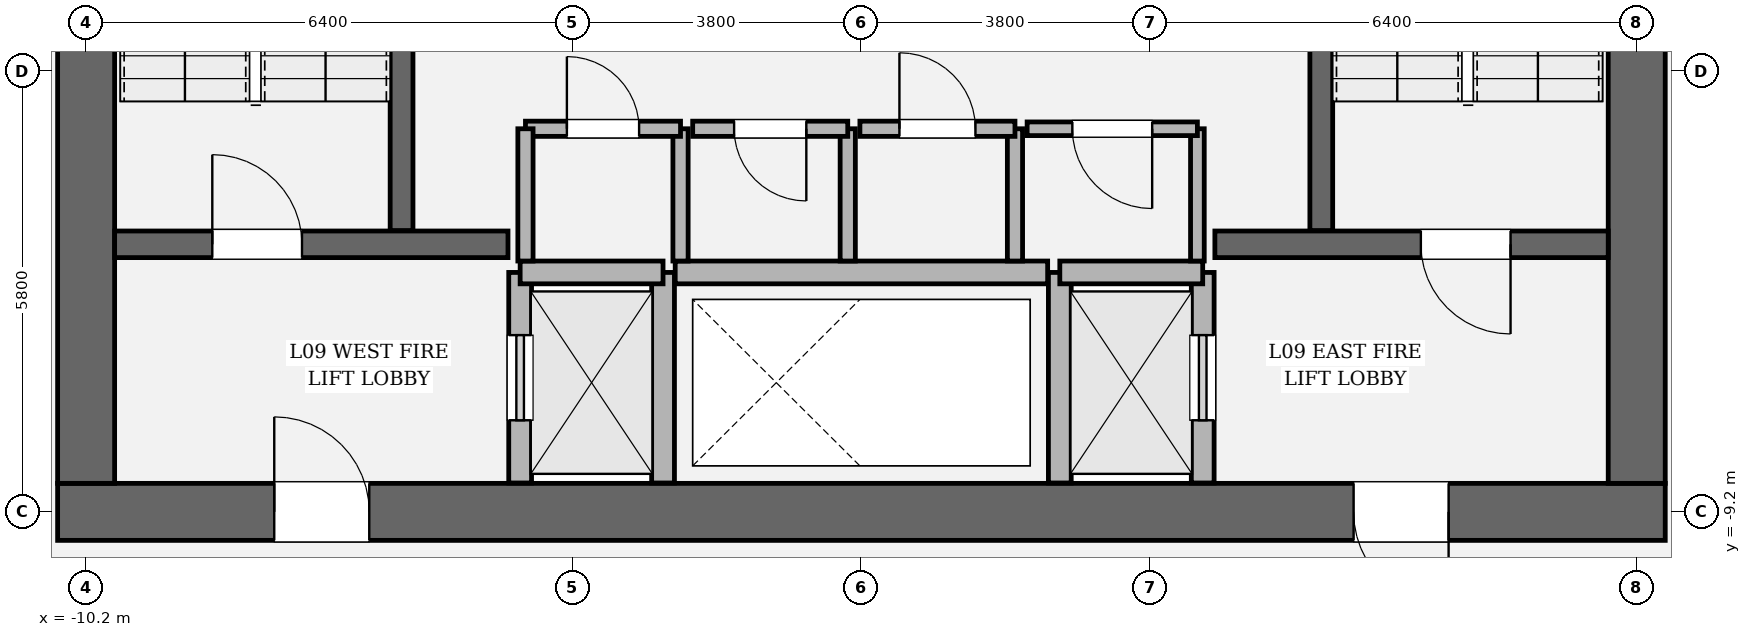
"""IFC4 building model, lengths in metres.
Left out: names, types, materials, properties, quantities, classifications, styles, units other than length and angle.
Written with IfcOpenShell. Run it as: python <this file> out.ifc"""

import sys

from ifc_helpers import new_model, si_unit, direction, frame, frame_2d, origin, place, context, subcontext, project, spatial, rectangle, extrude, element, fill, save


model = new_model("IFC4")
c1 = context("Model", 3, precision=1e-05, world=origin(), true_north=direction((0.0, 1.0)))
c2 = subcontext(c1, "Body", "Model", "MODEL_VIEW")
j1 = project(units=[si_unit("LENGTHUNIT", "METRE"), si_unit("PLANEANGLEUNIT", "RADIAN")], contexts=[c1])
p1 = place(None, origin())
s1 = spatial("IfcSite", under=j1, at=p1, CompositionType="ELEMENT")
p2 = place(p1, origin())
s2 = spatial("IfcBuilding", under=s1, at=p2, CompositionType="ELEMENT")
p3 = place(p2, frame((0.0, 0.0, 44.4)))
s3 = spatial("IfcBuildingStorey", under=s2, at=p3, CompositionType="ELEMENT", Elevation=44.4)
p4 = place(p3, frame((10.575, -9.2, 0.0), z_axis=(0.0, 0.0, 1.0), x_axis=(-1.0, 0.0, 0.0)))
e1 = element("IfcWall", 1, at=p4, inside=s3, PredefinedType="SHEAR", context=c2, shape_type="SweptSolid", body=[
    extrude(rectangle(XDim=21.15, YDim=0.75, at=frame_2d((10.575, 0.0))), origin(), (0.0, 0.0, 1.0), 4.05),
])
p5 = place(p4, frame((2.85, 0.0, 0.0)))
e2 = element("IfcOpeningElement", 2, at=p5, cuts=e1, PredefinedType="OPENING", context=c2, shape_type="SweptSolid", body=[
    extrude(rectangle(XDim=1.25, YDim=2.25, at=frame_2d((0.625, 1.125))), frame((0.0, 0.385, 0.0), z_axis=(0.0, -1.0, 0.0), x_axis=(1.0, 0.0, 0.0)), (0.0, 0.0, 1.0), 0.77),
])
p6 = place(p4, frame((17.05, 0.0, 0.0)))
e3 = element("IfcOpeningElement", 3, at=p6, cuts=e1, PredefinedType="OPENING", context=c2, shape_type="SweptSolid", body=[
    extrude(rectangle(XDim=1.25, YDim=2.25, at=frame_2d((0.625, 1.125))), frame((0.0, 0.385, 0.0), z_axis=(0.0, -1.0, 0.0), x_axis=(1.0, 0.0, 0.0)), (0.0, 0.0, 1.0), 0.77),
])
p7 = place(p3, frame((-10.2, -8.825, 0.0), z_axis=(0.0, 0.0, 1.0), x_axis=(0.0, 1.0, 0.0)))
e4 = element("IfcWall", 4, at=p7, inside=s3, PredefinedType="SHEAR", context=c2, shape_type="SweptSolid", body=[
    extrude(rectangle(XDim=17.65, YDim=0.75, at=frame_2d((8.825, 0.0))), origin(), (0.0, 0.0, 1.0), 4.05),
])
p8 = place(p7, frame((12.615, 0.0, 0.0)))
e5 = element("IfcOpeningElement", 5, at=p8, cuts=e4, PredefinedType="OPENING", context=c2, shape_type="SweptSolid", body=[
    extrude(rectangle(XDim=1.18, YDim=2.2, at=frame_2d((0.59, 1.1))), frame((0.0, 0.385, 0.0), z_axis=(0.0, -1.0, 0.0), x_axis=(1.0, 0.0, 0.0)), (0.0, 0.0, 1.0), 0.77),
])
p9 = place(p3, frame((10.2, 8.825, 0.0), z_axis=(0.0, 0.0, 1.0), x_axis=(0.0, -1.0, 0.0)))
e6 = element("IfcWall", 6, at=p9, inside=s3, PredefinedType="SHEAR", context=c2, shape_type="SweptSolid", body=[
    extrude(rectangle(XDim=17.65, YDim=0.75, at=frame_2d((8.825, 0.0))), origin(), (0.0, 0.0, 1.0), 4.05),
])
p10 = place(p9, frame((3.855, 0.0, 0.0)))
e7 = element("IfcOpeningElement", 7, at=p10, cuts=e6, PredefinedType="OPENING", context=c2, shape_type="SweptSolid", body=[
    extrude(rectangle(XDim=1.18, YDim=2.2, at=frame_2d((0.59, 1.1))), frame((0.0, 0.385, 0.0), z_axis=(0.0, -1.0, 0.0), x_axis=(1.0, 0.0, 0.0)), (0.0, 0.0, 1.0), 0.77),
])
for number, where, z_axis, x_axis in (
    (8, (-6.05, -5.5, 0.0), (0.0, 0.0, 1.0), (0.0, 1.0, 0.0)),
    (9, (6.05, 3.45, 0.0), (0.0, 0.0, 1.0), (0.0, -1.0, 0.0)),
):
    element("IfcWall", number, at=place(p3, frame(where, z_axis=z_axis, x_axis=x_axis)), inside=s3, PredefinedType="SOLIDWALL", context=c2, shape_type="SweptSolid", body=[
        extrude(rectangle(XDim=8.95, YDim=0.3, at=frame_2d((4.475, 0.0))), origin(), (0.0, 0.0, 1.0), 4.05),
    ])
p11 = place(p3, frame((-9.825, -5.68, 0.0), z_axis=(0.0, 0.0, 1.0), x_axis=(1.0, 0.0, 0.0)))
e10 = element("IfcWall", 10, at=p11, inside=s3, PredefinedType="SOLIDWALL", context=c2, shape_type="SweptSolid", body=[
    extrude(rectangle(XDim=5.175, YDim=0.35, at=frame_2d((2.587, 0.0))), origin(), (0.0, 0.0, 1.0), 4.05),
])
p12 = place(p11, frame((1.285, 0.0, 0.0)))
e11 = element("IfcOpeningElement", 11, at=p12, cuts=e10, PredefinedType="OPENING", context=c2, shape_type="SweptSolid", body=[
    extrude(rectangle(XDim=1.18, YDim=2.2, at=frame_2d((0.59, 1.1))), frame((0.0, 0.185, 0.0), z_axis=(0.0, -1.0, 0.0), x_axis=(1.0, 0.0, 0.0)), (0.0, 0.0, 1.0), 0.37),
])
p13 = place(p3, frame((4.65, -5.68, 0.0), z_axis=(0.0, 0.0, 1.0), x_axis=(1.0, 0.0, 0.0)))
e12 = element("IfcWall", 12, at=p13, inside=s3, PredefinedType="SOLIDWALL", context=c2, shape_type="SweptSolid", body=[
    extrude(rectangle(XDim=5.175, YDim=0.35, at=frame_2d((2.587, 0.0))), origin(), (0.0, 0.0, 1.0), 4.05),
])
p14 = place(p13, frame((2.71, 0.0, 0.0)))
e13 = element("IfcOpeningElement", 13, at=p14, cuts=e12, PredefinedType="OPENING", context=c2, shape_type="SweptSolid", body=[
    extrude(rectangle(XDim=1.18, YDim=2.2, at=frame_2d((0.59, 1.1))), frame((0.0, 0.185, 0.0), z_axis=(0.0, -1.0, 0.0), x_axis=(1.0, 0.0, 0.0)), (0.0, 0.0, 1.0), 0.37),
])
p15 = place(p3, frame((-4.49, -8.82, 0.0), z_axis=(0.0, 0.0, 1.0), x_axis=(0.0, 1.0, 0.0)))
e14 = element("IfcWall", 14, at=p15, inside=s3, PredefinedType="SOLIDWALL", context=c2, shape_type="SweptSolid", body=[
    extrude(rectangle(XDim=2.77, YDim=0.3, at=frame_2d((1.385, 0.0))), origin(), (0.0, 0.0, 1.0), 3.81),
])
p16 = place(p15, frame((0.825, 0.0, 0.0)))
e15 = element("IfcOpeningElement", 15, at=p16, cuts=e14, PredefinedType="OPENING", context=c2, shape_type="SweptSolid", body=[
    extrude(rectangle(XDim=1.12, YDim=2.25, at=frame_2d((0.56, 1.125))), frame((0.0, 0.16, 0.0), z_axis=(0.0, -1.0, 0.0), x_axis=(1.0, 0.0, 0.0)), (0.0, 0.0, 1.0), 0.32),
])
p17 = place(p3, frame((-2.61, -8.82, 0.0), z_axis=(0.0, 0.0, 1.0), x_axis=(0.0, 1.0, 0.0)))
e16 = element("IfcWall", 16, at=p17, inside=s3, PredefinedType="SOLIDWALL", context=c2, shape_type="SweptSolid", body=[
    extrude(rectangle(XDim=2.77, YDim=0.3, at=frame_2d((1.385, 0.0))), origin(), (0.0, 0.0, 1.0), 3.81),
])
p18 = place(p3, frame((-4.49, -6.05, 0.0), z_axis=(0.0, 0.0, 1.0), x_axis=(1.0, 0.0, 0.0)))
e17 = element("IfcWall", 17, at=p18, inside=s3, PredefinedType="SOLIDWALL", context=c2, shape_type="SweptSolid", body=[
    extrude(rectangle(XDim=1.88, YDim=0.3, at=frame_2d((0.94, 0.0))), origin(), (0.0, 0.0, 1.0), 3.81),
])
p19 = place(p3, frame((4.49, -8.82, 0.0), z_axis=(0.0, 0.0, 1.0), x_axis=(0.0, 1.0, 0.0)))
e18 = element("IfcWall", 18, at=p19, inside=s3, PredefinedType="SOLIDWALL", context=c2, shape_type="SweptSolid", body=[
    extrude(rectangle(XDim=2.77, YDim=0.3, at=frame_2d((1.385, 0.0))), origin(), (0.0, 0.0, 1.0), 3.81),
])
p20 = place(p19, frame((0.825, 0.0, 0.0)))
e19 = element("IfcOpeningElement", 19, at=p20, cuts=e18, PredefinedType="OPENING", context=c2, shape_type="SweptSolid", body=[
    extrude(rectangle(XDim=1.12, YDim=2.25, at=frame_2d((0.56, 1.125))), frame((0.0, 0.16, 0.0), z_axis=(0.0, -1.0, 0.0), x_axis=(1.0, 0.0, 0.0)), (0.0, 0.0, 1.0), 0.32),
])
p21 = place(p3, frame((2.61, -8.82, 0.0), z_axis=(0.0, 0.0, 1.0), x_axis=(0.0, 1.0, 0.0)))
e20 = element("IfcWall", 20, at=p21, inside=s3, PredefinedType="SOLIDWALL", context=c2, shape_type="SweptSolid", body=[
    extrude(rectangle(XDim=2.77, YDim=0.3, at=frame_2d((1.385, 0.0))), origin(), (0.0, 0.0, 1.0), 3.81),
])
p22 = place(p3, frame((2.61, -6.05, 0.0), z_axis=(0.0, 0.0, 1.0), x_axis=(1.0, 0.0, 0.0)))
e21 = element("IfcWall", 21, at=p22, inside=s3, PredefinedType="SOLIDWALL", context=c2, shape_type="SweptSolid", body=[
    extrude(rectangle(XDim=1.88, YDim=0.3, at=frame_2d((0.94, 0.0))), origin(), (0.0, 0.0, 1.0), 3.81),
])
p23 = place(p3, frame((-2.45, -6.05, 0.0), z_axis=(0.0, 0.0, 1.0), x_axis=(1.0, 0.0, 0.0)))
e22 = element("IfcWall", 22, at=p23, inside=s3, PredefinedType="SOLIDWALL", context=c2, shape_type="SweptSolid", body=[
    extrude(rectangle(XDim=4.9, YDim=0.3, at=frame_2d((2.45, 0.0))), origin(), (0.0, 0.0, 1.0), 3.81),
])
p24 = place(p3, frame((-2.38, -5.9, 0.0), z_axis=(0.0, 0.0, 1.0), x_axis=(0.0, 1.0, 0.0)))
e23 = element("IfcWall", 23, at=p24, inside=s3, PredefinedType="SOLIDWALL", context=c2, shape_type="SweptSolid", body=[
    extrude(rectangle(XDim=1.74, YDim=0.2, at=frame_2d((0.87, 0.0))), origin(), (0.0, 0.0, 1.0), 3.81),
])
p25 = place(p3, frame((-2.38, -4.16, 0.0), z_axis=(0.0, 0.0, 1.0), x_axis=(-1.0, 0.0, 0.0)))
e24 = element("IfcWall", 24, at=p25, inside=s3, PredefinedType="SOLIDWALL", context=c2, shape_type="SweptSolid", body=[
    extrude(rectangle(XDim=2.04, YDim=0.2, at=frame_2d((1.02, 0.0))), origin(), (0.0, 0.0, 1.0), 3.81),
])
p26 = place(p25, frame((0.545, 0.0, 0.0)))
e25 = element("IfcOpeningElement", 25, at=p26, cuts=e24, PredefinedType="OPENING", context=c2, shape_type="SweptSolid", body=[
    extrude(rectangle(XDim=0.95, YDim=2.15, at=frame_2d((0.475, 1.075))), frame((0.0, 0.11, 0.0), z_axis=(0.0, -1.0, 0.0), x_axis=(1.0, 0.0, 0.0)), (0.0, 0.0, 1.0), 0.22),
])
for number, where, z_axis, x_axis in (
    (26, (-4.42, -4.16, 0.0), (0.0, 0.0, 1.0), (0.0, -1.0, 0.0)),
    (27, (-0.18, -5.9, 0.0), (0.0, 0.0, 1.0), (0.0, 1.0, 0.0)),
):
    element("IfcWall", number, at=place(p3, frame(where, z_axis=z_axis, x_axis=x_axis)), inside=s3, PredefinedType="SOLIDWALL", context=c2, shape_type="SweptSolid", body=[
        extrude(rectangle(XDim=1.74, YDim=0.2, at=frame_2d((0.87, 0.0))), origin(), (0.0, 0.0, 1.0), 3.81),
    ])
p27 = place(p3, frame((-0.18, -4.16, 0.0), z_axis=(0.0, 0.0, 1.0), x_axis=(-1.0, 0.0, 0.0)))
e28 = element("IfcWall", 28, at=p27, inside=s3, PredefinedType="SOLIDWALL", context=c2, shape_type="SweptSolid", body=[
    extrude(rectangle(XDim=2.04, YDim=0.2, at=frame_2d((1.02, 0.0))), origin(), (0.0, 0.0, 1.0), 3.81),
])
p28 = place(p27, frame((0.545, 0.0, 0.0)))
e29 = element("IfcOpeningElement", 29, at=p28, cuts=e28, PredefinedType="OPENING", context=c2, shape_type="SweptSolid", body=[
    extrude(rectangle(XDim=0.95, YDim=2.15, at=frame_2d((0.475, 1.075))), frame((0.0, 0.11, 0.0), z_axis=(0.0, -1.0, 0.0), x_axis=(1.0, 0.0, 0.0)), (0.0, 0.0, 1.0), 0.22),
])
p29 = place(p3, frame((2.02, -5.9, 0.0), z_axis=(0.0, 0.0, 1.0), x_axis=(0.0, 1.0, 0.0)))
e30 = element("IfcWall", 30, at=p29, inside=s3, PredefinedType="SOLIDWALL", context=c2, shape_type="SweptSolid", body=[
    extrude(rectangle(XDim=1.74, YDim=0.2, at=frame_2d((0.87, 0.0))), origin(), (0.0, 0.0, 1.0), 3.81),
])
p30 = place(p3, frame((2.02, -4.16, 0.0), z_axis=(0.0, 0.0, 1.0), x_axis=(-1.0, 0.0, 0.0)))
e31 = element("IfcWall", 31, at=p30, inside=s3, PredefinedType="SOLIDWALL", context=c2, shape_type="SweptSolid", body=[
    extrude(rectangle(XDim=2.04, YDim=0.2, at=frame_2d((1.02, 0.0))), origin(), (0.0, 0.0, 1.0), 3.81),
])
p31 = place(p30, frame((0.52, 0.0, 0.0)))
e32 = element("IfcOpeningElement", 32, at=p31, cuts=e31, PredefinedType="OPENING", context=c2, shape_type="SweptSolid", body=[
    extrude(rectangle(XDim=1.0, YDim=2.15, at=frame_2d((0.5, 1.075))), frame((0.0, 0.11, 0.0), z_axis=(0.0, -1.0, 0.0), x_axis=(1.0, 0.0, 0.0)), (0.0, 0.0, 1.0), 0.22),
])
p32 = place(p3, frame((4.42, -5.9, 0.0), z_axis=(0.0, 0.0, 1.0), x_axis=(0.0, 1.0, 0.0)))
e33 = element("IfcWall", 33, at=p32, inside=s3, PredefinedType="PARTITIONING", context=c2, shape_type="SweptSolid", body=[
    extrude(rectangle(XDim=1.74, YDim=0.18, at=frame_2d((0.87, 0.0))), origin(), (0.0, 0.0, 1.0), 3.81),
])
p33 = place(p3, frame((4.42, -4.16, 0.0), z_axis=(0.0, 0.0, 1.0), x_axis=(-1.0, 0.0, 0.0)))
e34 = element("IfcWall", 34, at=p33, inside=s3, PredefinedType="PARTITIONING", context=c2, shape_type="SweptSolid", body=[
    extrude(rectangle(XDim=2.24, YDim=0.18, at=frame_2d((1.12, 0.0))), origin(), (0.0, 0.0, 1.0), 3.81),
])
p34 = place(p33, frame((0.595, 0.0, 0.0)))
e35 = element("IfcOpeningElement", 35, at=p34, cuts=e34, PredefinedType="OPENING", context=c2, shape_type="SweptSolid", body=[
    extrude(rectangle(XDim=1.05, YDim=2.2, at=frame_2d((0.525, 1.1))), frame((0.0, 0.1, 0.0), z_axis=(0.0, -1.0, 0.0), x_axis=(1.0, 0.0, 0.0)), (0.0, 0.0, 1.0), 0.2),
])
p35 = place(p12, origin())
e36 = element("IfcDoor", 36, at=p35, inside=s3, OperationType="SINGLE_SWING_LEFT", PredefinedType="DOOR", context=c2, shape_type="SweptSolid", body=[
    extrude(rectangle(XDim=1.18, YDim=2.2, at=frame_2d((0.59, 1.1))), frame((0.0, 0.025, 0.0), z_axis=(0.0, -1.0, 0.0), x_axis=(1.0, 0.0, 0.0)), (0.0, 0.0, 1.0), 0.05),
])
fill(e11, e36)
p36 = place(p14, origin())
e37 = element("IfcDoor", 37, at=p36, inside=s3, OperationType="SINGLE_SWING_RIGHT", PredefinedType="DOOR", context=c2, shape_type="SweptSolid", body=[
    extrude(rectangle(XDim=1.18, YDim=2.2, at=frame_2d((0.59, 1.1))), frame((0.0, 0.025, 0.0), z_axis=(0.0, -1.0, 0.0), x_axis=(1.0, 0.0, 0.0)), (0.0, 0.0, 1.0), 0.05),
])
fill(e13, e37)
p37 = place(p5, origin())
e38 = element("IfcDoor", 38, at=p37, inside=s3, OperationType="SINGLE_SWING_LEFT", PredefinedType="DOOR", context=c2, shape_type="SweptSolid", body=[
    extrude(rectangle(XDim=1.25, YDim=2.25, at=frame_2d((0.625, 1.125))), frame((0.0, 0.025, 0.0), z_axis=(0.0, -1.0, 0.0), x_axis=(1.0, 0.0, 0.0)), (0.0, 0.0, 1.0), 0.05),
])
fill(e2, e38)
p38 = place(p6, origin())
e39 = element("IfcDoor", 39, at=p38, inside=s3, OperationType="SINGLE_SWING_RIGHT", PredefinedType="DOOR", context=c2, shape_type="SweptSolid", body=[
    extrude(rectangle(XDim=1.25, YDim=2.25, at=frame_2d((0.625, 1.125))), frame((0.0, 0.025, 0.0), z_axis=(0.0, -1.0, 0.0), x_axis=(1.0, 0.0, 0.0)), (0.0, 0.0, 1.0), 0.05),
])
fill(e3, e39)
p39 = place(p16, origin())
e40 = element("IfcDoor", 40, at=p39, inside=s3, OperationType="SLIDING_TO_LEFT", PredefinedType="DOOR", context=c2, shape_type="SweptSolid", body=[
    extrude(rectangle(XDim=1.12, YDim=2.25, at=frame_2d((0.56, 1.125))), frame((0.0, 0.025, 0.0), z_axis=(0.0, -1.0, 0.0), x_axis=(1.0, 0.0, 0.0)), (0.0, 0.0, 1.0), 0.05),
])
fill(e15, e40)
p40 = place(p20, origin())
e41 = element("IfcDoor", 41, at=p40, inside=s3, OperationType="SLIDING_TO_RIGHT", PredefinedType="DOOR", context=c2, shape_type="SweptSolid", body=[
    extrude(rectangle(XDim=1.12, YDim=2.25, at=frame_2d((0.56, 1.125))), frame((0.0, 0.025, 0.0), z_axis=(0.0, -1.0, 0.0), x_axis=(1.0, 0.0, 0.0)), (0.0, 0.0, 1.0), 0.05),
])
fill(e19, e41)
p41 = place(p26, origin())
e42 = element("IfcDoor", 42, at=p41, inside=s3, OperationType="SINGLE_SWING_RIGHT", PredefinedType="DOOR", context=c2, shape_type="SweptSolid", body=[
    extrude(rectangle(XDim=0.95, YDim=2.15, at=frame_2d((0.475, 1.075))), frame((0.0, 0.025, 0.0), z_axis=(0.0, -1.0, 0.0), x_axis=(1.0, 0.0, 0.0)), (0.0, 0.0, 1.0), 0.05),
])
fill(e25, e42)
p42 = place(p28, origin())
e43 = element("IfcDoor", 43, at=p42, inside=s3, OperationType="SINGLE_SWING_LEFT", PredefinedType="DOOR", context=c2, shape_type="SweptSolid", body=[
    extrude(rectangle(XDim=0.95, YDim=2.15, at=frame_2d((0.475, 1.075))), frame((0.0, 0.025, 0.0), z_axis=(0.0, -1.0, 0.0), x_axis=(1.0, 0.0, 0.0)), (0.0, 0.0, 1.0), 0.05),
])
fill(e29, e43)
p43 = place(p31, origin())
e44 = element("IfcDoor", 44, at=p43, inside=s3, OperationType="SINGLE_SWING_RIGHT", PredefinedType="DOOR", context=c2, shape_type="SweptSolid", body=[
    extrude(rectangle(XDim=1.0, YDim=2.15, at=frame_2d((0.5, 1.075))), frame((0.0, 0.025, 0.0), z_axis=(0.0, -1.0, 0.0), x_axis=(1.0, 0.0, 0.0)), (0.0, 0.0, 1.0), 0.05),
])
fill(e32, e44)
p44 = place(p34, origin())
e45 = element("IfcDoor", 45, at=p44, inside=s3, OperationType="SINGLE_SWING_LEFT", PredefinedType="DOOR", context=c2, shape_type="SweptSolid", body=[
    extrude(rectangle(XDim=1.05, YDim=2.2, at=frame_2d((0.525, 1.1))), frame((0.0, 0.025, 0.0), z_axis=(0.0, -1.0, 0.0), x_axis=(1.0, 0.0, 0.0)), (0.0, 0.0, 1.0), 0.05),
])
fill(e35, e45)
save(model, sys.argv[1])
